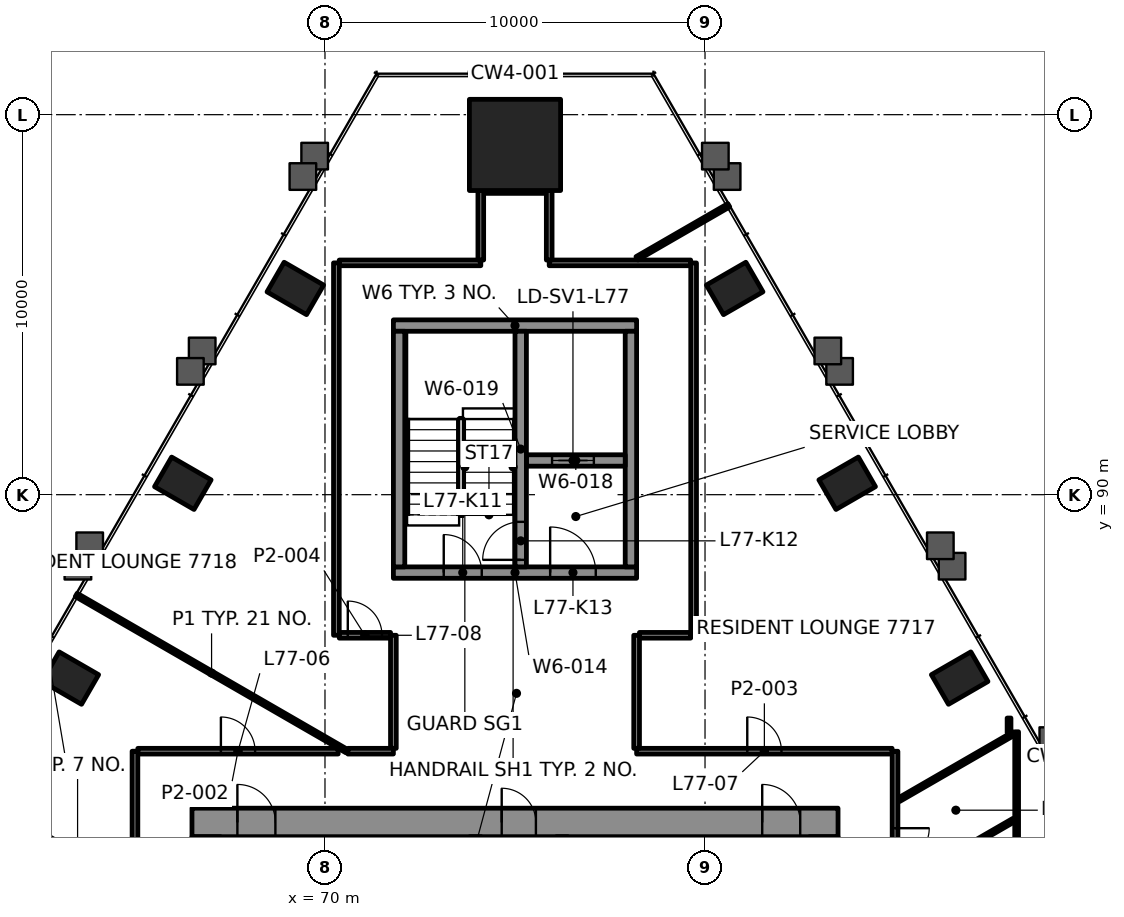
"""IFC4 building model, lengths in metres.
Left out: names, types, materials, properties, quantities, classifications, styles, units other than length and angle.
Written with IfcOpenShell. Run it as: python <this file> out.ifc"""

import sys

from ifc_helpers import new_model, si_unit, direction, frame, frame_2d, origin, origin_2d, place, context, subcontext, project, spatial, rectangle, hollow_rectangle, extrude, element, fill, save


model = new_model("IFC4")
c1 = context("Model", 3, precision=1e-05, world=origin(), true_north=direction((0.0, 1.0)))
c2 = subcontext(c1, "Body", "Model", "MODEL_VIEW")
j1 = project(units=[si_unit("LENGTHUNIT", "METRE"), si_unit("PLANEANGLEUNIT", "RADIAN")], contexts=[c1])
p1 = place(None, origin())
s1 = spatial("IfcSite", under=j1, at=p1, CompositionType="ELEMENT")
p2 = place(p1, origin())
s2 = spatial("IfcBuilding", under=s1, at=p2, CompositionType="ELEMENT")
p3 = place(p2, frame((0.0, 0.0, 316.1)))
s3 = spatial("IfcBuildingStorey", under=s2, at=p3, CompositionType="ELEMENT", Elevation=316.1)
p4 = place(p3, frame((75.0, 99.204, 0.0), z_axis=(0.0, 0.0, 1.0), x_axis=(-1.0, 0.0, 0.0)))
e1 = element("IfcColumn", 1, at=p4, inside=s3, PredefinedType="COLUMN", context=c2, shape_type="SweptSolid", body=[
    extrude(rectangle(XDim=2.4, YDim=2.4, at=origin_2d()), origin(), (0.0, 0.0, 1.0), 3.5),
])
for number, where, z_axis, x_axis in (
    (2, (86.701, 85.173, -0.0), (0.0, 0.0, 1.0), (-0.5, 0.866, 0.0)),
    (3, (83.74, 90.3, -0.0), (0.0, 0.0, 1.0), (-0.5, 0.866, 0.0)),
    (4, (80.781, 95.427, -0.0), (0.0, 0.0, 1.0), (-0.5, 0.866, 0.0)),
    (5, (69.219, 95.427, -0.0), (0.0, 0.0, 1.0), (-0.5, -0.866, 0.0)),
    (6, (66.26, 90.3, -0.0), (0.0, 0.0, 1.0), (-0.5, -0.866, 0.0)),
    (7, (63.299, 85.173, -0.0), (0.0, 0.0, 1.0), (-0.5, -0.866, 0.0)),
):
    element("IfcColumn", number, at=place(p3, frame(where, z_axis=z_axis, x_axis=x_axis)), inside=s3, PredefinedType="COLUMN", context=c2, shape_type="SweptSolid", body=[
        extrude(hollow_rectangle(XDim=0.9, YDim=1.2, WallThickness=0.06, at=origin_2d()), origin(), (0.0, 0.0, 1.0), 3.5),
    ])
p5 = place(p3, frame((66.5, 81.375, 0.0), z_axis=(0.0, 0.0, 1.0), x_axis=(1.0, 0.0, 0.0)))
e8 = element("IfcWall", 8, at=p5, inside=s3, PredefinedType="SHEAR", context=c2, shape_type="SweptSolid", body=[
    extrude(rectangle(XDim=17.0, YDim=0.75, at=frame_2d((8.5, 0.0))), origin(), (0.0, 0.0, 1.0), 3.3),
])
p6 = place(p5, frame((1.195, 0.0, 0.0)))
e9 = element("IfcOpeningElement", 9, at=p6, cuts=e8, PredefinedType="OPENING", context=c2, shape_type="SweptSolid", body=[
    extrude(rectangle(XDim=1.0, YDim=2.1, at=frame_2d((0.5, 1.05))), frame((0.0, 0.385, 0.0), z_axis=(0.0, -1.0, 0.0), x_axis=(1.0, 0.0, 0.0)), (0.0, 0.0, 1.0), 0.77),
])
p7 = place(p5, frame((15.005, 0.0, 0.0)))
e10 = element("IfcOpeningElement", 10, at=p7, cuts=e8, PredefinedType="OPENING", context=c2, shape_type="SweptSolid", body=[
    extrude(rectangle(XDim=1.0, YDim=2.1, at=frame_2d((0.5, 1.05))), frame((0.0, 0.385, 0.0), z_axis=(0.0, -1.0, 0.0), x_axis=(1.0, 0.0, 0.0)), (0.0, 0.0, 1.0), 0.77),
])
p8 = place(p5, frame((8.15, 0.0, 0.0)))
e11 = element("IfcOpeningElement", 11, at=p8, cuts=e8, PredefinedType="OPENING", context=c2, shape_type="SweptSolid", body=[
    extrude(rectangle(XDim=0.9, YDim=2.1, at=frame_2d((0.45, 1.05))), frame((0.0, 0.385, 0.0), z_axis=(0.0, -1.0, 0.0), x_axis=(1.0, 0.0, 0.0)), (0.0, 0.0, 1.0), 0.77),
])
p9 = place(p3, frame((66.875, 69.0, 0.0), z_axis=(0.0, 0.0, 1.0), x_axis=(0.0, 1.0, 0.0)))
e12 = element("IfcWall", 12, at=p9, inside=s3, PredefinedType="SHEAR", context=c2, shape_type="SweptSolid", body=[
    extrude(rectangle(XDim=12.0, YDim=0.75, at=frame_2d((6.0, 0.0))), origin(), (0.0, 0.0, 1.0), 3.3),
])
p10 = place(p9, frame((3.7, 0.0, 0.0)))
e13 = element("IfcOpeningElement", 13, at=p10, cuts=e12, PredefinedType="OPENING", context=c2, shape_type="SweptSolid", body=[
    extrude(rectangle(XDim=1.2, YDim=2.1, at=frame_2d((0.6, 1.05))), frame((0.0, 0.385, 0.0), z_axis=(0.0, -1.0, 0.0), x_axis=(1.0, 0.0, 0.0)), (0.0, 0.0, 1.0), 0.77),
])
p11 = place(p3, frame((83.125, 69.0, 0.0), z_axis=(0.0, 0.0, 1.0), x_axis=(0.0, 1.0, 0.0)))
e14 = element("IfcWall", 14, at=p11, inside=s3, PredefinedType="SHEAR", context=c2, shape_type="SweptSolid", body=[
    extrude(rectangle(XDim=12.0, YDim=0.75, at=frame_2d((6.0, 0.0))), origin(), (0.0, 0.0, 1.0), 3.3),
])
p12 = place(p11, frame((3.4, 0.0, 0.0)))
e15 = element("IfcOpeningElement", 15, at=p12, cuts=e14, PredefinedType="OPENING", context=c2, shape_type="SweptSolid", body=[
    extrude(rectangle(XDim=1.8, YDim=2.1, at=frame_2d((0.9, 1.05))), frame((0.0, 0.385, 0.0), z_axis=(0.0, -1.0, 0.0), x_axis=(1.0, 0.0, 0.0)), (0.0, 0.0, 1.0), 0.77),
])
for number, where, z_axis, x_axis in (
    (16, (73.96, 77.9, 0.0), (0.0, 0.0, 1.0), (0.0, 1.0, 0.0)),
    (17, (76.24, 77.9, 0.0), (0.0, 0.0, 1.0), (0.0, 1.0, 0.0)),
):
    element("IfcWall", number, at=place(p3, frame(where, z_axis=z_axis, x_axis=x_axis)), inside=s3, PredefinedType="SHEAR", context=c2, shape_type="SweptSolid", body=[
        extrude(rectangle(XDim=3.1, YDim=0.3, at=frame_2d((1.55, 0.0))), origin(), (0.0, 0.0, 1.0), 3.3),
    ])
p13 = place(p3, frame((71.8, 87.95, 0.0), z_axis=(0.0, 0.0, 1.0), x_axis=(1.0, 0.0, 0.0)))
e18 = element("IfcWall", 18, at=p13, inside=s3, PredefinedType="SHEAR", context=c2, shape_type="SweptSolid", body=[
    extrude(rectangle(XDim=6.4, YDim=0.3, at=frame_2d((3.2, 0.0))), origin(), (0.0, 0.0, 1.0), 3.3),
])
p14 = place(p13, frame((1.325, 0.0, 0.0)))
e19 = element("IfcOpeningElement", 19, at=p14, cuts=e18, PredefinedType="OPENING", context=c2, shape_type="SweptSolid", body=[
    extrude(rectangle(XDim=1.0, YDim=2.1, at=frame_2d((0.5, 1.05))), frame((0.0, 0.16, 0.0), z_axis=(0.0, -1.0, 0.0), x_axis=(1.0, 0.0, 0.0)), (0.0, 0.0, 1.0), 0.32),
])
p15 = place(p13, frame((4.125, 0.0, 0.0)))
e20 = element("IfcOpeningElement", 20, at=p15, cuts=e18, PredefinedType="OPENING", context=c2, shape_type="SweptSolid", body=[
    extrude(rectangle(XDim=1.2, YDim=2.1, at=frame_2d((0.6, 1.05))), frame((0.0, 0.16, 0.0), z_axis=(0.0, -1.0, 0.0), x_axis=(1.0, 0.0, 0.0)), (0.0, 0.0, 1.0), 0.32),
])
p16 = place(p3, frame((71.8, 94.45, 0.0), z_axis=(0.0, 0.0, 1.0), x_axis=(1.0, 0.0, 0.0)))
e21 = element("IfcWall", 21, at=p16, inside=s3, PredefinedType="SHEAR", context=c2, shape_type="SweptSolid", body=[
    extrude(rectangle(XDim=6.4, YDim=0.3, at=frame_2d((3.2, 0.0))), origin(), (0.0, 0.0, 1.0), 3.3),
])
for number, where, z_axis, x_axis in (
    (22, (71.95, 88.1, 0.0), (0.0, 0.0, 1.0), (0.0, 1.0, 0.0)),
    (23, (78.05, 88.1, 0.0), (0.0, 0.0, 1.0), (0.0, 1.0, 0.0)),
):
    element("IfcWall", number, at=place(p3, frame(where, z_axis=z_axis, x_axis=x_axis)), inside=s3, PredefinedType="SHEAR", context=c2, shape_type="SweptSolid", body=[
        extrude(rectangle(XDim=6.2, YDim=0.3, at=frame_2d((3.1, 0.0))), origin(), (0.0, 0.0, 1.0), 3.3),
    ])
p17 = place(p3, frame((75.3, 90.9, 0.0), z_axis=(0.0, 0.0, 1.0), x_axis=(1.0, 0.0, 0.0)))
e24 = element("IfcWall", 24, at=p17, inside=s3, PredefinedType="SHEAR", context=c2, shape_type="SweptSolid", body=[
    extrude(rectangle(XDim=2.6, YDim=0.3, at=frame_2d((1.3, 0.0))), origin(), (0.0, 0.0, 1.0), 3.3),
])
p18 = place(p17, frame((0.675, 0.0, 0.0)))
e25 = element("IfcOpeningElement", 25, at=p18, cuts=e24, PredefinedType="OPENING", context=c2, shape_type="SweptSolid", body=[
    extrude(rectangle(XDim=1.1, YDim=2.1, at=frame_2d((0.55, 1.05))), frame((0.0, 0.16, 0.0), z_axis=(0.0, -1.0, 0.0), x_axis=(1.0, 0.0, 0.0)), (0.0, 0.0, 1.0), 0.32),
])
p19 = place(p3, frame((75.15, 88.1, 0.0), z_axis=(0.0, 0.0, 1.0), x_axis=(0.0, 1.0, 0.0)))
e26 = element("IfcWall", 26, at=p19, inside=s3, PredefinedType="SHEAR", context=c2, shape_type="SweptSolid", body=[
    extrude(rectangle(XDim=6.2, YDim=0.3, at=frame_2d((3.1, 0.0))), origin(), (0.0, 0.0, 1.0), 3.3),
])
p20 = place(p19, frame((0.185, 0.0, 0.0)))
e27 = element("IfcOpeningElement", 27, at=p20, cuts=e26, PredefinedType="OPENING", context=c2, shape_type="SweptSolid", body=[
    extrude(rectangle(XDim=1.0, YDim=2.1, at=frame_2d((0.5, 1.05))), frame((0.0, 0.16, 0.0), z_axis=(0.0, -1.0, 0.0), x_axis=(1.0, 0.0, 0.0)), (0.0, 0.0, 1.0), 0.32),
])
p21 = place(p3, frame((65.075, 83.25, 0.0), z_axis=(0.0, 0.0, 1.0), x_axis=(1.0, 0.0, 0.0)))
e28 = element("IfcWall", 28, at=p21, inside=s3, PredefinedType="PARTITIONING", context=c2, shape_type="SweptSolid", body=[
    extrude(rectangle(XDim=5.271, YDim=0.15, at=frame_2d((2.636, 0.0))), origin(), (0.0, 0.0, 1.0), 2.7),
])
p22 = place(p21, frame((2.186, 0.0, 0.0)))
e29 = element("IfcOpeningElement", 29, at=p22, cuts=e28, PredefinedType="OPENING", context=c2, shape_type="SweptSolid", body=[
    extrude(rectangle(XDim=0.9, YDim=2.1, at=frame_2d((0.45, 1.05))), frame((0.0, 0.085, 0.0), z_axis=(0.0, -1.0, 0.0), x_axis=(1.0, 0.0, 0.0)), (0.0, 0.0, 1.0), 0.17),
])
p23 = place(p3, frame((78.2, 83.25, 0.0), z_axis=(0.0, 0.0, 1.0), x_axis=(1.0, 0.0, 0.0)))
e30 = element("IfcWall", 30, at=p23, inside=s3, PredefinedType="PARTITIONING", context=c2, shape_type="SweptSolid", body=[
    extrude(rectangle(XDim=6.723, YDim=0.15, at=frame_2d((3.362, 0.0))), origin(), (0.0, 0.0, 1.0), 2.7),
])
p24 = place(p23, frame((2.911, 0.0, 0.0)))
e31 = element("IfcOpeningElement", 31, at=p24, cuts=e30, PredefinedType="OPENING", context=c2, shape_type="SweptSolid", body=[
    extrude(rectangle(XDim=0.9, YDim=2.1, at=frame_2d((0.45, 1.05))), frame((0.0, 0.085, 0.0), z_axis=(0.0, -1.0, 0.0), x_axis=(1.0, 0.0, 0.0)), (0.0, 0.0, 1.0), 0.17),
])
p25 = place(p3, frame((70.375, 86.3, 0.0), z_axis=(0.0, 0.0, 1.0), x_axis=(1.0, 0.0, 0.0)))
e32 = element("IfcWall", 32, at=p25, inside=s3, PredefinedType="PARTITIONING", context=c2, shape_type="SweptSolid", body=[
    extrude(rectangle(XDim=1.349, YDim=0.15, at=frame_2d((0.675, 0.0))), origin(), (0.0, 0.0, 1.0), 2.7),
])
p26 = place(p25, frame((0.225, 0.0, 0.0)))
e33 = element("IfcOpeningElement", 33, at=p26, cuts=e32, PredefinedType="OPENING", context=c2, shape_type="SweptSolid", body=[
    extrude(rectangle(XDim=0.9, YDim=2.1, at=frame_2d((0.45, 1.05))), frame((0.0, 0.085, 0.0), z_axis=(0.0, -1.0, 0.0), x_axis=(1.0, 0.0, 0.0)), (0.0, 0.0, 1.0), 0.17),
])
p27 = place(p3, frame((78.275, 86.3, 0.0), z_axis=(0.0, 0.0, 1.0), x_axis=(1.0, 0.0, 0.0)))
e34 = element("IfcWall", 34, at=p27, inside=s3, PredefinedType="PARTITIONING", context=c2, shape_type="SweptSolid", body=[
    extrude(rectangle(XDim=1.348, YDim=0.15, at=frame_2d((0.674, 0.0))), origin(), (0.0, 0.0, 1.0), 2.7),
])
p28 = place(p3, frame((70.375, 96.1, 0.0), z_axis=(0.0, 0.0, 1.0), x_axis=(1.0, 0.0, 0.0)))
e35 = element("IfcWall", 35, at=p28, inside=s3, PredefinedType="PARTITIONING", context=c2, shape_type="SweptSolid", body=[
    extrude(rectangle(XDim=3.725, YDim=0.15, at=frame_2d((1.862, 0.0))), origin(), (0.0, 0.0, 1.0), 2.7),
])
p29 = place(p3, frame((75.9, 96.1, 0.0), z_axis=(0.0, 0.0, 1.0), x_axis=(1.0, 0.0, 0.0)))
e36 = element("IfcWall", 36, at=p29, inside=s3, PredefinedType="PARTITIONING", context=c2, shape_type="SweptSolid", body=[
    extrude(rectangle(XDim=3.723, YDim=0.15, at=frame_2d((1.862, 0.0))), origin(), (0.0, 0.0, 1.0), 2.7),
])
p30 = place(p3, frame((74.176, 98.004, 0.0), z_axis=(0.0, 0.0, 1.0), x_axis=(1.0, 0.0, 0.0)))
e37 = element("IfcWall", 37, at=p30, inside=s3, PredefinedType="PARTITIONING", context=c2, shape_type="SweptSolid", body=[
    extrude(rectangle(XDim=1.649, YDim=0.15, at=frame_2d((0.824, 0.0))), origin(), (0.0, 0.0, 1.0), 2.697),
])
p31 = place(p3, frame((85.101, 79.692, 0.0), z_axis=(0.0, 0.0, 1.0), x_axis=(0.866017863565, 0.500013059815, 0.0)))
e38 = element("IfcWall", 38, at=p31, inside=s3, PredefinedType="PARTITIONING", context=c2, shape_type="SweptSolid", body=[
    extrude(rectangle(XDim=3.491, YDim=0.1, at=frame_2d((1.745, 0.0))), origin(), (0.0, 0.0, 1.0), 2.7),
])
p32 = place(p3, frame((85.101, 81.971, 0.0), z_axis=(0.0, 0.0, 1.0), x_axis=(0.866017863565, 0.500013059815, 0.0)))
e39 = element("IfcWall", 39, at=p32, inside=s3, PredefinedType="PARTITIONING", context=c2, shape_type="SweptSolid", body=[
    extrude(rectangle(XDim=3.491, YDim=0.1, at=frame_2d((1.745, 0.0))), origin(), (0.0, 0.0, 1.0), 2.688),
])
p33 = place(p3, frame((78.208, 96.22, 0.0), z_axis=(0.0, 0.0, 1.0), x_axis=(0.866028321769, 0.499994945868, 0.0)))
e40 = element("IfcWall", 40, at=p33, inside=s3, PredefinedType="PARTITIONING", context=c2, shape_type="SweptSolid", body=[
    extrude(rectangle(XDim=2.792, YDim=0.1, at=frame_2d((1.396, 0.0))), origin(), (0.0, 0.0, 1.0), 2.7),
])
p34 = place(p3, frame((88.2, 79.203, 0.0), z_axis=(0.0, 0.0, 1.0), x_axis=(0.0, 1.0, 0.0)))
e41 = element("IfcWall", 41, at=p34, inside=s3, PredefinedType="PARTITIONING", context=c2, shape_type="SweptSolid", body=[
    extrude(rectangle(XDim=4.557, YDim=0.1, at=frame_2d((2.279, 0.0))), origin(), (0.0, 0.0, 1.0), 2.688),
])
p35 = place(p3, frame((88.0, 83.733, 0.0), z_axis=(0.0, 0.0, 1.0), x_axis=(0.0, 1.0, 0.0)))
e42 = element("IfcWall", 42, at=p35, inside=s3, PredefinedType="PARTITIONING", context=c2, shape_type="SweptSolid", body=[
    extrude(rectangle(XDim=0.39, YDim=0.1, at=frame_2d((0.195, 0.0))), origin(), (0.0, 0.0, 1.0), 2.7),
])
p36 = place(p3, frame((85.0, 83.248, 0.0), z_axis=(0.0, 0.0, 1.0), x_axis=(0.0, -1.0, 0.0)))
e43 = element("IfcWall", 43, at=p36, inside=s3, PredefinedType="PARTITIONING", context=c2, shape_type="SweptSolid", body=[
    extrude(rectangle(XDim=12.982, YDim=0.15, at=frame_2d((6.491, 0.0))), origin(), (0.0, 0.0, 1.0), 2.7),
])
p37 = place(p36, frame((2.024, 0.0, 0.0)))
e44 = element("IfcOpeningElement", 44, at=p37, cuts=e43, PredefinedType="OPENING", context=c2, shape_type="SweptSolid", body=[
    extrude(rectangle(XDim=0.9, YDim=2.1, at=frame_2d((0.45, 1.05))), frame((0.0, 0.085, 0.0), z_axis=(0.0, -1.0, 0.0), x_axis=(1.0, 0.0, 0.0)), (0.0, 0.0, 1.0), 0.17),
])
p38 = place(p36, frame((4.303, 0.0, 0.0)))
e45 = element("IfcOpeningElement", 45, at=p38, cuts=e43, PredefinedType="OPENING", context=c2, shape_type="SweptSolid", body=[
    extrude(rectangle(XDim=0.9, YDim=2.1, at=frame_2d((0.45, 1.05))), frame((0.0, 0.085, 0.0), z_axis=(0.0, -1.0, 0.0), x_axis=(1.0, 0.0, 0.0)), (0.0, 0.0, 1.0), 0.17),
])
p39 = place(p36, frame((8.836, 0.0, 0.0)))
e46 = element("IfcOpeningElement", 46, at=p39, cuts=e43, PredefinedType="OPENING", context=c2, shape_type="SweptSolid", body=[
    extrude(rectangle(XDim=1.0, YDim=2.1, at=frame_2d((0.5, 1.05))), frame((0.0, 0.085, 0.0), z_axis=(0.0, -1.0, 0.0), x_axis=(1.0, 0.0, 0.0)), (0.0, 0.0, 1.0), 0.17),
])
p40 = place(p3, frame((79.7, 86.302, 0.0), z_axis=(0.0, 0.0, 1.0), x_axis=(0.0, 1.0, 0.0)))
e47 = element("IfcWall", 47, at=p40, inside=s3, PredefinedType="PARTITIONING", context=c2, shape_type="SweptSolid", body=[
    extrude(rectangle(XDim=9.796, YDim=0.15, at=frame_2d((4.898, 0.0))), origin(), (0.0, 0.0, 1.0), 2.7),
])
p41 = place(p3, frame((78.2, 83.325, 0.0), z_axis=(0.0, 0.0, 1.0), x_axis=(0.0, 1.0, 0.0)))
e48 = element("IfcWall", 48, at=p41, inside=s3, PredefinedType="PARTITIONING", context=c2, shape_type="SweptSolid", body=[
    extrude(rectangle(XDim=2.975, YDim=0.15, at=frame_2d((1.488, 0.0))), origin(), (0.0, 0.0, 1.0), 2.7),
])
for number, where, z_axis, x_axis in (
    (49, (75.9, 96.175, 0.0), (0.0, 0.0, 1.0), (0.0, 1.0, 0.0)),
    (50, (74.1, 96.175, 0.0), (0.0, 0.0, 1.0), (0.0, 1.0, 0.0)),
):
    element("IfcWall", number, at=place(p3, frame(where, z_axis=z_axis, x_axis=x_axis)), inside=s3, PredefinedType="PARTITIONING", context=c2, shape_type="SweptSolid", body=[
        extrude(rectangle(XDim=1.828, YDim=0.15, at=frame_2d((0.914, 0.0))), origin(), (0.0, 0.0, 1.0), 2.7),
    ])
p42 = place(p3, frame((71.8, 83.325, 0.0), z_axis=(0.0, 0.0, 1.0), x_axis=(0.0, 1.0, 0.0)))
e51 = element("IfcWall", 51, at=p42, inside=s3, PredefinedType="PARTITIONING", context=c2, shape_type="SweptSolid", body=[
    extrude(rectangle(XDim=2.975, YDim=0.15, at=frame_2d((1.488, 0.0))), origin(), (0.0, 0.0, 1.0), 2.7),
])
p43 = place(p3, frame((70.3, 86.301, 0.0), z_axis=(0.0, 0.0, 1.0), x_axis=(0.0, 1.0, 0.0)))
e52 = element("IfcWall", 52, at=p43, inside=s3, PredefinedType="PARTITIONING", context=c2, shape_type="SweptSolid", body=[
    extrude(rectangle(XDim=9.799, YDim=0.15, at=frame_2d((4.899, 0.0))), origin(), (0.0, 0.0, 1.0), 2.7),
])
p44 = place(p3, frame((65.0, 70.266, 0.0), z_axis=(0.0, 0.0, 1.0), x_axis=(0.0, 1.0, 0.0)))
e53 = element("IfcWall", 53, at=p44, inside=s3, PredefinedType="PARTITIONING", context=c2, shape_type="SweptSolid", body=[
    extrude(rectangle(XDim=12.984, YDim=0.15, at=frame_2d((6.492, 0.0))), origin(), (0.0, 0.0, 1.0), 2.7),
])
p45 = place(p3, frame((70.577, 83.25, 0.0), z_axis=(0.0, 0.0, 1.0), x_axis=(-0.866020477552, 0.500008532388, 0.0)))
e54 = element("IfcWall", 54, at=p45, inside=s3, PredefinedType="PARTITIONING", context=c2, shape_type="SweptSolid", body=[
    extrude(rectangle(XDim=8.224, YDim=0.1, at=frame_2d((4.112, 0.0))), origin(), (0.0, 0.0, 1.0), 2.688),
])
p46 = place(p3, frame((64.89, 79.697, 0.0), z_axis=(0.0, 0.0, 1.0), x_axis=(-0.866013313631, 0.500020940175, 0.0)))
e55 = element("IfcWall", 55, at=p46, inside=s3, PredefinedType="PARTITIONING", context=c2, shape_type="SweptSolid", body=[
    extrude(rectangle(XDim=3.233, YDim=0.12, at=frame_2d((1.617, 0.0))), origin(), (0.0, 0.0, 1.0), 2.7),
])
p47 = place(p3, frame((70.602, 83.25, 0.0), z_axis=(0.0, 0.0, 1.0), x_axis=(1.0, 0.0, 0.0)))
e56 = element("IfcWall", 56, at=p47, inside=s3, PredefinedType="PARTITIONING", context=c2, shape_type="SweptSolid", body=[
    extrude(rectangle(XDim=1.198, YDim=0.15, at=frame_2d((0.599, 0.0))), origin(), (0.0, 0.0, 1.0), 2.7),
])
p48 = place(p22, origin())
e57 = element("IfcDoor", 57, at=p48, inside=s3, OperationType="SINGLE_SWING_RIGHT", PredefinedType="DOOR", context=c2, shape_type="SweptSolid", body=[
    extrude(rectangle(XDim=0.9, YDim=2.1, at=frame_2d((0.45, 1.05))), frame((0.0, 0.025, 0.0), z_axis=(0.0, -1.0, 0.0), x_axis=(1.0, 0.0, 0.0)), (0.0, 0.0, 1.0), 0.05),
])
fill(e29, e57)
p49 = place(p24, origin())
e58 = element("IfcDoor", 58, at=p49, inside=s3, OperationType="SINGLE_SWING_RIGHT", PredefinedType="DOOR", context=c2, shape_type="SweptSolid", body=[
    extrude(rectangle(XDim=0.9, YDim=2.1, at=frame_2d((0.45, 1.05))), frame((0.0, 0.025, 0.0), z_axis=(0.0, -1.0, 0.0), x_axis=(1.0, 0.0, 0.0)), (0.0, 0.0, 1.0), 0.05),
])
fill(e31, e58)
p50 = place(p26, origin())
e59 = element("IfcDoor", 59, at=p50, inside=s3, OperationType="SINGLE_SWING_LEFT", PredefinedType="DOOR", context=c2, shape_type="SweptSolid", body=[
    extrude(rectangle(XDim=0.9, YDim=2.1, at=frame_2d((0.45, 1.05))), frame((0.0, 0.025, 0.0), z_axis=(0.0, -1.0, 0.0), x_axis=(1.0, 0.0, 0.0)), (0.0, 0.0, 1.0), 0.05),
])
fill(e33, e59)
p51 = place(p37, origin())
e60 = element("IfcDoor", 60, at=p51, inside=s3, OperationType="SINGLE_SWING_RIGHT", PredefinedType="DOOR", context=c2, shape_type="SweptSolid", body=[
    extrude(rectangle(XDim=0.9, YDim=2.1, at=frame_2d((0.45, 1.05))), frame((0.0, 0.025, 0.0), z_axis=(0.0, -1.0, 0.0), x_axis=(1.0, 0.0, 0.0)), (0.0, 0.0, 1.0), 0.05),
])
fill(e44, e60)
p52 = place(p18, origin())
e61 = element("IfcDoor", 61, at=p52, inside=s3, OperationType="DOUBLE_DOOR_SLIDING", PredefinedType="DOOR", context=c2, shape_type="SweptSolid", body=[
    extrude(rectangle(XDim=1.1, YDim=2.1, at=frame_2d((0.55, 1.05))), frame((0.0, 0.025, 0.0), z_axis=(0.0, -1.0, 0.0), x_axis=(1.0, 0.0, 0.0)), (0.0, 0.0, 1.0), 0.05),
])
fill(e25, e61)
p53 = place(p6, origin())
e62 = element("IfcDoor", 62, at=p53, inside=s3, OperationType="SINGLE_SWING_RIGHT", PredefinedType="DOOR", context=c2, shape_type="SweptSolid", body=[
    extrude(rectangle(XDim=1.0, YDim=2.1, at=frame_2d((0.5, 1.05))), frame((0.0, 0.095, 0.0), z_axis=(0.0, -1.0, 0.0), x_axis=(1.0, 0.0, 0.0)), (0.0, 0.0, 1.0), 0.19),
])
fill(e9, e62)
p54 = place(p7, origin())
e63 = element("IfcDoor", 63, at=p54, inside=s3, OperationType="SINGLE_SWING_LEFT", PredefinedType="DOOR", context=c2, shape_type="SweptSolid", body=[
    extrude(rectangle(XDim=1.0, YDim=2.1, at=frame_2d((0.5, 1.05))), frame((0.0, 0.095, 0.0), z_axis=(0.0, -1.0, 0.0), x_axis=(1.0, 0.0, 0.0)), (0.0, 0.0, 1.0), 0.19),
])
fill(e10, e63)
p55 = place(p14, origin())
e64 = element("IfcDoor", 64, at=p55, inside=s3, OperationType="SINGLE_SWING_RIGHT", PredefinedType="DOOR", context=c2, shape_type="SweptSolid", body=[
    extrude(rectangle(XDim=1.0, YDim=2.1, at=frame_2d((0.5, 1.05))), frame((0.0, 0.025, 0.0), z_axis=(0.0, -1.0, 0.0), x_axis=(1.0, 0.0, 0.0)), (0.0, 0.0, 1.0), 0.05),
])
fill(e19, e64)
p56 = place(p20, origin())
e65 = element("IfcDoor", 65, at=p56, inside=s3, OperationType="SINGLE_SWING_LEFT", PredefinedType="DOOR", context=c2, shape_type="SweptSolid", body=[
    extrude(rectangle(XDim=1.0, YDim=2.1, at=frame_2d((0.5, 1.05))), frame((0.0, 0.025, 0.0), z_axis=(0.0, -1.0, 0.0), x_axis=(1.0, 0.0, 0.0)), (0.0, 0.0, 1.0), 0.05),
])
fill(e27, e65)
p57 = place(p15, origin())
e66 = element("IfcDoor", 66, at=p57, inside=s3, OperationType="SINGLE_SWING_RIGHT", PredefinedType="DOOR", context=c2, shape_type="SweptSolid", body=[
    extrude(rectangle(XDim=1.2, YDim=2.1, at=frame_2d((0.6, 1.05))), frame((0.0, 0.025, 0.0), z_axis=(0.0, -1.0, 0.0), x_axis=(1.0, 0.0, 0.0)), (0.0, 0.0, 1.0), 0.05),
])
fill(e20, e66)
p58 = place(p8, origin())
e67 = element("IfcDoor", 67, at=p58, inside=s3, OperationType="SINGLE_SWING_RIGHT", PredefinedType="DOOR", context=c2, shape_type="SweptSolid", body=[
    extrude(rectangle(XDim=0.9, YDim=2.1, at=frame_2d((0.45, 1.05))), frame((0.0, 0.095, 0.0), z_axis=(0.0, -1.0, 0.0), x_axis=(1.0, 0.0, 0.0)), (0.0, 0.0, 1.0), 0.19),
])
fill(e11, e67)
save(model, sys.argv[1])
